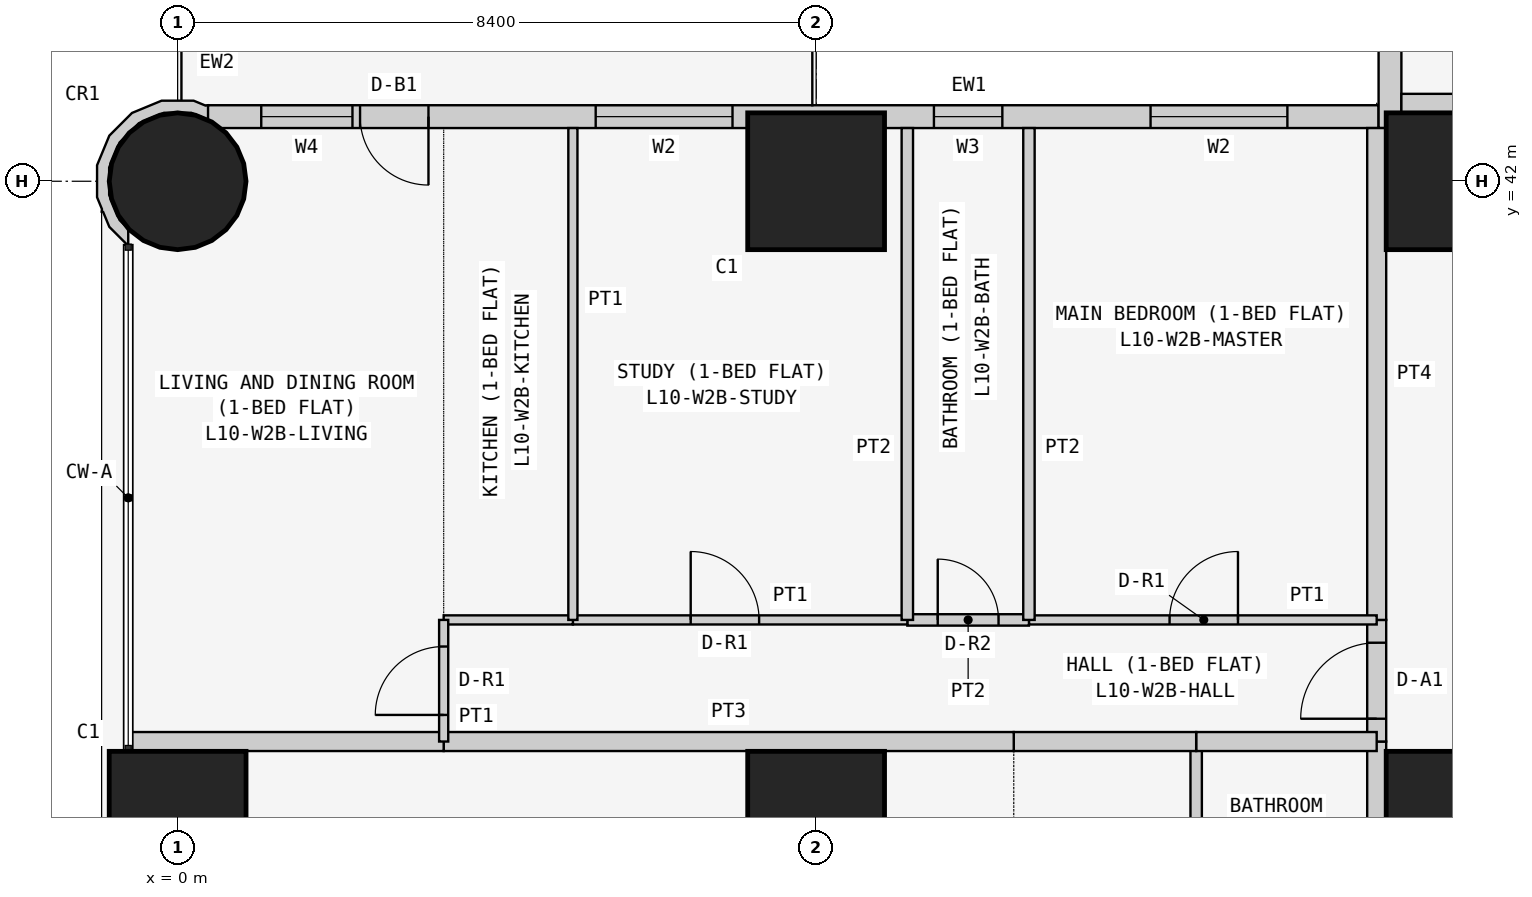
"""IFC4 building model, lengths in metres.
Left out: names, types, materials, properties, quantities, classifications, styles, units other than length and angle.
Written with IfcOpenShell. Run it as: python <this file> out.ifc"""

import sys

from ifc_helpers import new_model, si_unit, direction, frame, frame_2d, origin, origin_2d, place, context, subcontext, project, spatial, polyline, rectangle, circle, outline, extrude, element, fill, save


model = new_model("IFC4")
c1 = context("Model", 3, precision=1e-05, world=origin(), true_north=direction((0.0, 1.0)))
c2 = subcontext(c1, "Body", "Model", "MODEL_VIEW")
j1 = project(units=[si_unit("LENGTHUNIT", "METRE"), si_unit("PLANEANGLEUNIT", "RADIAN")], contexts=[c1])
p1 = place(None, origin())
s1 = spatial("IfcSite", under=j1, at=p1, CompositionType="ELEMENT")
p2 = place(p1, origin())
s2 = spatial("IfcBuilding", under=s1, at=p2, CompositionType="ELEMENT")
p3 = place(p2, frame((0.0, 0.0, 45.3)))
s3 = spatial("IfcBuildingStorey", under=s2, at=p3, CompositionType="ELEMENT", Elevation=45.3)
p4 = place(p3, frame((0.0, 33.6, 0.0), z_axis=(0.0, 0.0, 1.0), x_axis=(1.0, 0.0, 0.0)))
e1 = element("IfcColumn", 1, at=p4, inside=s3, PredefinedType="COLUMN", context=c2, shape_type="SweptSolid", body=[
    extrude(rectangle(XDim=1.8, YDim=1.8, at=origin_2d()), origin(), (0.0, 0.0, 1.0), 3.6),
])
p5 = place(p3, frame((0.0, 42.0, 0.0), z_axis=(0.0, 0.0, 1.0), x_axis=(1.0, 0.0, 0.0)))
e2 = element("IfcColumn", 2, at=p5, inside=s3, PredefinedType="COLUMN", context=c2, shape_type="SweptSolid", body=[
    extrude(circle(Radius=0.9, at=origin_2d()), origin(), (0.0, 0.0, 1.0), 3.6),
])
for number, where, z_axis, x_axis in (
    (3, (8.4, 33.6, 0.0), (0.0, 0.0, 1.0), (1.0, 0.0, 0.0)),
    (4, (8.4, 42.0, 0.0), (0.0, 0.0, 1.0), (1.0, 0.0, 0.0)),
    (5, (16.8, 33.6, 0.0), (0.0, 0.0, 1.0), (1.0, 0.0, 0.0)),
    (6, (16.8, 42.0, 0.0), (0.0, 0.0, 1.0), (1.0, 0.0, 0.0)),
):
    element("IfcColumn", number, at=place(p3, frame(where, z_axis=z_axis, x_axis=x_axis)), inside=s3, PredefinedType="COLUMN", context=c2, shape_type="SweptSolid", body=[
        extrude(rectangle(XDim=1.8, YDim=1.8, at=origin_2d()), origin(), (0.0, 0.0, 1.0), 3.6),
    ])
p6 = place(p3, frame((15.8, 42.85, 0.0), z_axis=(0.0, 0.0, 1.0), x_axis=(-1.0, 0.0, 0.0)))
e7 = element("IfcWall", 7, at=p6, inside=s3, PredefinedType="SOLIDWALL", context=c2, shape_type="SweptSolid", body=[
    extrude(rectangle(XDim=15.4, YDim=0.3, at=frame_2d((7.7, 0.0))), origin(), (0.0, 0.0, 1.0), 3.45),
])
p7 = place(p6, frame((1.2, 0.0, 0.9)))
e8 = element("IfcOpeningElement", 8, at=p7, cuts=e7, PredefinedType="OPENING", context=c2, shape_type="SweptSolid", body=[
    extrude(rectangle(XDim=1.8, YDim=1.5, at=frame_2d((0.9, 0.75))), frame((0.0, 0.16, 0.0), z_axis=(0.0, -1.0, 0.0), x_axis=(1.0, 0.0, 0.0)), (0.0, 0.0, 1.0), 0.32),
])
p8 = place(p6, frame((4.95, 0.0, 1.5)))
e9 = element("IfcOpeningElement", 9, at=p8, cuts=e7, PredefinedType="OPENING", context=c2, shape_type="SweptSolid", body=[
    extrude(rectangle(XDim=0.9, YDim=0.7, at=frame_2d((0.45, 0.35))), frame((0.0, 0.16, 0.0), z_axis=(0.0, -1.0, 0.0), x_axis=(1.0, 0.0, 0.0)), (0.0, 0.0, 1.0), 0.32),
])
p9 = place(p6, frame((8.5, 0.0, 0.9)))
e10 = element("IfcOpeningElement", 10, at=p9, cuts=e7, PredefinedType="OPENING", context=c2, shape_type="SweptSolid", body=[
    extrude(rectangle(XDim=1.8, YDim=1.5, at=frame_2d((0.9, 0.75))), frame((0.0, 0.16, 0.0), z_axis=(0.0, -1.0, 0.0), x_axis=(1.0, 0.0, 0.0)), (0.0, 0.0, 1.0), 0.32),
])
p10 = place(p6, frame((12.5, 0.0, 0.0)))
e11 = element("IfcOpeningElement", 11, at=p10, cuts=e7, PredefinedType="OPENING", context=c2, shape_type="SweptSolid", body=[
    extrude(rectangle(XDim=0.9, YDim=2.4, at=frame_2d((0.45, 1.2))), frame((0.0, 0.16, 0.0), z_axis=(0.0, -1.0, 0.0), x_axis=(1.0, 0.0, 0.0)), (0.0, 0.0, 1.0), 0.32),
])
p11 = place(p6, frame((13.5, 0.0, 0.9)))
e12 = element("IfcOpeningElement", 12, at=p11, cuts=e7, PredefinedType="OPENING", context=c2, shape_type="SweptSolid", body=[
    extrude(rectangle(XDim=1.2, YDim=1.5, at=frame_2d((0.6, 0.75))), frame((0.0, 0.16, 0.0), z_axis=(0.0, -1.0, 0.0), x_axis=(1.0, 0.0, 0.0)), (0.0, 0.0, 1.0), 0.32),
])
p12 = place(p3, frame((15.95, 58.4, 0.0), z_axis=(0.0, 0.0, 1.0), x_axis=(0.0, -1.0, 0.0)))
e13 = element("IfcWall", 13, at=p12, inside=s3, PredefinedType="SOLIDWALL", context=c2, shape_type="SweptSolid", body=[
    extrude(rectangle(XDim=15.7, YDim=0.3, at=frame_2d((7.85, 0.0))), origin(), (0.0, 0.0, 1.0), 3.45),
])
p13 = place(p12, frame((12.4, 0.0, 0.9)))
e14 = element("IfcOpeningElement", 14, at=p13, cuts=e13, PredefinedType="OPENING", context=c2, shape_type="SweptSolid", body=[
    extrude(rectangle(XDim=1.8, YDim=1.5, at=frame_2d((0.9, 0.75))), frame((0.0, 0.16, 0.0), z_axis=(0.0, -1.0, 0.0), x_axis=(1.0, 0.0, 0.0)), (0.0, 0.0, 1.0), 0.32),
])
p14 = place(p12, frame((9.55, 0.0, 1.5)))
e15 = element("IfcOpeningElement", 15, at=p14, cuts=e13, PredefinedType="OPENING", context=c2, shape_type="SweptSolid", body=[
    extrude(rectangle(XDim=0.9, YDim=0.7, at=frame_2d((0.45, 0.35))), frame((0.0, 0.16, 0.0), z_axis=(0.0, -1.0, 0.0), x_axis=(1.0, 0.0, 0.0)), (0.0, 0.0, 1.0), 0.32),
])
p15 = place(p12, frame((5.1, 0.0, 0.9)))
e16 = element("IfcOpeningElement", 16, at=p15, cuts=e13, PredefinedType="OPENING", context=c2, shape_type="SweptSolid", body=[
    extrude(rectangle(XDim=1.8, YDim=1.5, at=frame_2d((0.9, 0.75))), frame((0.0, 0.16, 0.0), z_axis=(0.0, -1.0, 0.0), x_axis=(1.0, 0.0, 0.0)), (0.0, 0.0, 1.0), 0.32),
])
p16 = place(p12, frame((2.0, 0.0, 0.0)))
e17 = element("IfcOpeningElement", 17, at=p16, cuts=e13, PredefinedType="OPENING", context=c2, shape_type="SweptSolid", body=[
    extrude(rectangle(XDim=0.9, YDim=2.4, at=frame_2d((0.45, 1.2))), frame((0.0, 0.16, 0.0), z_axis=(0.0, -1.0, 0.0), x_axis=(1.0, 0.0, 0.0)), (0.0, 0.0, 1.0), 0.32),
])
p17 = place(p12, frame((0.7, 0.0, 0.9)))
e18 = element("IfcOpeningElement", 18, at=p17, cuts=e13, PredefinedType="OPENING", context=c2, shape_type="SweptSolid", body=[
    extrude(rectangle(XDim=1.2, YDim=1.5, at=frame_2d((0.6, 0.75))), frame((0.0, 0.16, 0.0), z_axis=(0.0, -1.0, 0.0), x_axis=(1.0, 0.0, 0.0)), (0.0, 0.0, 1.0), 0.32),
])
p18 = place(p3, frame((0.364, 42.91, 0.0), z_axis=(0.0, 0.0, 1.0), x_axis=(-0.926129809145, 0.377204953059, 0.0)))
e19 = element("IfcWall", 19, at=p18, inside=s3, PredefinedType="SOLIDWALL", context=c2, shape_type="SweptSolid", body=[
    extrude(outline(polyline([(0.36, 1.803), (0.509, 1.741), (0.761, 1.486), (0.896, 1.154), (0.894, 0.795), (0.755, 0.465), (0.5, 0.213), (0.168, 0.078), (-0.1, 0.08), (0.001, -0.097), (0.03, -0.08), (0.199, -0.081), (0.589, 0.078), (0.889, 0.374), (1.053, 0.763), (1.055, 1.185), (0.896, 1.575), (0.778, 1.695), (0.769, 1.728), (0.75, 1.723), (0.6, 1.875), (0.295, 2.003), (0.281, 1.998), (0.36, 1.803)])), origin(), (0.0, 0.0, 1.0), 3.45),
])
p19 = place(p3, frame((16.1, 43.025, 0.0), z_axis=(0.0, 0.0, 1.0), x_axis=(1.0, 0.0, 0.0)))
e20 = element("IfcWall", 20, at=p19, inside=s3, PredefinedType="PARTITIONING", context=c2, shape_type="SweptSolid", body=[
    extrude(rectangle(XDim=6.871, YDim=0.25, at=frame_2d((3.436, 0.0))), origin(), (0.0, 0.0, 1.0), 3.45),
])
p20 = place(p3, frame((15.775, 32.0, 0.0), z_axis=(0.0, 0.0, 1.0), x_axis=(0.0, 1.0, 0.0)))
e21 = element("IfcWall", 21, at=p20, inside=s3, PredefinedType="PARTITIONING", context=c2, shape_type="SweptSolid", body=[
    extrude(rectangle(XDim=2.629, YDim=0.25, at=frame_2d((1.314, 0.0))), origin(), (0.0, 0.0, 1.0), 3.45),
])
p21 = place(p3, frame((15.775, 34.629, 0.0), z_axis=(0.0, 0.0, 1.0), x_axis=(0.0, 1.0, 0.0)))
e22 = element("IfcWall", 22, at=p21, inside=s3, PredefinedType="PARTITIONING", context=c2, shape_type="SweptSolid", body=[
    extrude(rectangle(XDim=1.6, YDim=0.25, at=frame_2d((0.8, 0.0))), origin(), (0.0, 0.0, 1.0), 3.45),
])
p22 = place(p21, frame((0.3, 0.0, 0.0)))
e23 = element("IfcOpeningElement", 23, at=p22, cuts=e22, PredefinedType="OPENING", context=c2, shape_type="SweptSolid", body=[
    extrude(rectangle(XDim=1.0, YDim=2.1, at=frame_2d((0.5, 1.05))), frame((0.0, 0.135, 0.0), z_axis=(0.0, -1.0, 0.0), x_axis=(1.0, 0.0, 0.0)), (0.0, 0.0, 1.0), 0.27),
])
p23 = place(p3, frame((15.775, 36.229, 0.0), z_axis=(0.0, 0.0, 1.0), x_axis=(0.0, 1.0, 0.0)))
e24 = element("IfcWall", 24, at=p23, inside=s3, PredefinedType="PARTITIONING", context=c2, shape_type="SweptSolid", body=[
    extrude(rectangle(XDim=6.471, YDim=0.25, at=frame_2d((3.235, 0.0))), origin(), (0.0, 0.0, 1.0), 3.45),
])
p24 = place(p3, frame((13.4, 32.0, 0.0), z_axis=(0.0, 0.0, 1.0), x_axis=(0.0, 1.0, 0.0)))
e25 = element("IfcWall", 25, at=p24, inside=s3, PredefinedType="PARTITIONING", context=c2, shape_type="SweptSolid", body=[
    extrude(rectangle(XDim=2.629, YDim=0.15, at=frame_2d((1.314, 0.0))), origin(), (0.0, 0.0, 1.0), 3.45),
])
p25 = place(p3, frame((13.4, 34.629, 0.0), z_axis=(0.0, 0.0, 1.0), x_axis=(1.0, 0.0, 0.0)))
e26 = element("IfcWall", 26, at=p25, inside=s3, PredefinedType="PARTITIONING", context=c2, shape_type="SweptSolid", body=[
    extrude(rectangle(XDim=2.375, YDim=0.25, at=frame_2d((1.188, 0.0))), origin(), (0.0, 0.0, 1.0), 3.45),
])
p26 = place(p3, frame((11.0, 34.629, 0.0), z_axis=(0.0, 0.0, 1.0), x_axis=(1.0, 0.0, 0.0)))
e27 = element("IfcWall", 27, at=p26, inside=s3, PredefinedType="PARTITIONING", context=c2, shape_type="SweptSolid", body=[
    extrude(rectangle(XDim=2.4, YDim=0.25, at=frame_2d((1.2, 0.0))), origin(), (0.0, 0.0, 1.0), 3.45),
])
p27 = place(p3, frame((3.5, 34.629, 0.0), z_axis=(0.0, 0.0, 1.0), x_axis=(1.0, 0.0, 0.0)))
e28 = element("IfcWall", 28, at=p27, inside=s3, PredefinedType="PARTITIONING", context=c2, shape_type="SweptSolid", body=[
    extrude(rectangle(XDim=7.5, YDim=0.25, at=frame_2d((3.75, 0.0))), origin(), (0.0, 0.0, 1.0), 3.45),
])
p28 = place(p3, frame((-0.65, 34.629, 0.0), z_axis=(0.0, 0.0, 1.0), x_axis=(1.0, 0.0, 0.0)))
e29 = element("IfcWall", 29, at=p28, inside=s3, PredefinedType="PARTITIONING", context=c2, shape_type="SweptSolid", body=[
    extrude(rectangle(XDim=4.15, YDim=0.25, at=frame_2d((2.075, 0.0))), origin(), (0.0, 0.0, 1.0), 3.45),
])
p29 = place(p3, frame((11.2, 36.229, 0.0), z_axis=(0.0, 0.0, 1.0), x_axis=(1.0, 0.0, 0.0)))
e30 = element("IfcWall", 30, at=p29, inside=s3, PredefinedType="PARTITIONING", context=c2, shape_type="SweptSolid", body=[
    extrude(rectangle(XDim=4.575, YDim=0.12, at=frame_2d((2.288, 0.0))), origin(), (0.0, 0.0, 1.0), 3.45),
])
p30 = place(p29, frame((1.85, 0.0, 0.0)))
e31 = element("IfcOpeningElement", 31, at=p30, cuts=e30, PredefinedType="OPENING", context=c2, shape_type="SweptSolid", body=[
    extrude(rectangle(XDim=0.9, YDim=2.1, at=frame_2d((0.45, 1.05))), frame((0.0, 0.07, 0.0), z_axis=(0.0, -1.0, 0.0), x_axis=(1.0, 0.0, 0.0)), (0.0, 0.0, 1.0), 0.14),
])
p31 = place(p3, frame((9.6, 36.229, 0.0), z_axis=(0.0, 0.0, 1.0), x_axis=(1.0, 0.0, 0.0)))
e32 = element("IfcWall", 32, at=p31, inside=s3, PredefinedType="PARTITIONING", context=c2, shape_type="SweptSolid", body=[
    extrude(rectangle(XDim=1.6, YDim=0.15, at=frame_2d((0.8, 0.0))), origin(), (0.0, 0.0, 1.0), 3.45),
])
p32 = place(p31, frame((0.4, 0.0, 0.0)))
e33 = element("IfcOpeningElement", 33, at=p32, cuts=e32, PredefinedType="OPENING", context=c2, shape_type="SweptSolid", body=[
    extrude(rectangle(XDim=0.8, YDim=2.1, at=frame_2d((0.4, 1.05))), frame((0.0, 0.085, 0.0), z_axis=(0.0, -1.0, 0.0), x_axis=(1.0, 0.0, 0.0)), (0.0, 0.0, 1.0), 0.17),
])
p33 = place(p3, frame((5.2, 36.229, 0.0), z_axis=(0.0, 0.0, 1.0), x_axis=(1.0, 0.0, 0.0)))
e34 = element("IfcWall", 34, at=p33, inside=s3, PredefinedType="PARTITIONING", context=c2, shape_type="SweptSolid", body=[
    extrude(rectangle(XDim=4.4, YDim=0.12, at=frame_2d((2.2, 0.0))), origin(), (0.0, 0.0, 1.0), 3.45),
])
p34 = place(p33, frame((1.55, 0.0, 0.0)))
e35 = element("IfcOpeningElement", 35, at=p34, cuts=e34, PredefinedType="OPENING", context=c2, shape_type="SweptSolid", body=[
    extrude(rectangle(XDim=0.9, YDim=2.1, at=frame_2d((0.45, 1.05))), frame((0.0, 0.07, 0.0), z_axis=(0.0, -1.0, 0.0), x_axis=(1.0, 0.0, 0.0)), (0.0, 0.0, 1.0), 0.14),
])
p35 = place(p3, frame((3.5, 36.229, 0.0), z_axis=(0.0, 0.0, 1.0), x_axis=(1.0, 0.0, 0.0)))
e36 = element("IfcWall", 36, at=p35, inside=s3, PredefinedType="PARTITIONING", context=c2, shape_type="SweptSolid", body=[
    extrude(rectangle(XDim=1.7, YDim=0.12, at=frame_2d((0.85, 0.0))), origin(), (0.0, 0.0, 1.0), 3.45),
])
p36 = place(p3, frame((3.5, 34.629, 0.0), z_axis=(0.0, 0.0, 1.0), x_axis=(0.0, 1.0, 0.0)))
e37 = element("IfcWall", 37, at=p36, inside=s3, PredefinedType="PARTITIONING", context=c2, shape_type="SweptSolid", body=[
    extrude(rectangle(XDim=1.6, YDim=0.12, at=frame_2d((0.8, 0.0))), origin(), (0.0, 0.0, 1.0), 3.45),
])
p37 = place(p36, frame((0.35, 0.0, 0.0)))
e38 = element("IfcOpeningElement", 38, at=p37, cuts=e37, PredefinedType="OPENING", context=c2, shape_type="SweptSolid", body=[
    extrude(rectangle(XDim=0.9, YDim=2.1, at=frame_2d((0.45, 1.05))), frame((0.0, 0.07, 0.0), z_axis=(0.0, -1.0, 0.0), x_axis=(1.0, 0.0, 0.0)), (0.0, 0.0, 1.0), 0.14),
])
for number, where, z_axis, x_axis in (
    (39, (11.2, 36.229, 0.0), (0.0, 0.0, 1.0), (0.0, 1.0, 0.0)),
    (40, (9.6, 36.229, 0.0), (0.0, 0.0, 1.0), (0.0, 1.0, 0.0)),
):
    element("IfcWall", number, at=place(p3, frame(where, z_axis=z_axis, x_axis=x_axis)), inside=s3, PredefinedType="PARTITIONING", context=c2, shape_type="SweptSolid", body=[
        extrude(rectangle(XDim=6.471, YDim=0.15, at=frame_2d((3.235, 0.0))), origin(), (0.0, 0.0, 1.0), 3.45),
    ])
p38 = place(p3, frame((5.2, 36.229, 0.0), z_axis=(0.0, 0.0, 1.0), x_axis=(0.0, 1.0, 0.0)))
e41 = element("IfcWall", 41, at=p38, inside=s3, PredefinedType="PARTITIONING", context=c2, shape_type="SweptSolid", body=[
    extrude(rectangle(XDim=6.471, YDim=0.12, at=frame_2d((3.235, 0.0))), origin(), (0.0, 0.0, 1.0), 3.45),
])
p39 = place(p7, origin())
e42 = element("IfcWindow", 42, at=p39, inside=s3, PartitioningType="SINGLE_PANEL", PredefinedType="WINDOW", context=c2, shape_type="SweptSolid", body=[
    extrude(rectangle(XDim=1.8, YDim=1.5, at=frame_2d((0.9, 0.75))), frame((0.0, 0.03, 0.0), z_axis=(0.0, -1.0, 0.0), x_axis=(1.0, 0.0, 0.0)), (0.0, 0.0, 1.0), 0.06),
])
fill(e8, e42)
p40 = place(p8, origin())
e43 = element("IfcWindow", 43, at=p40, inside=s3, PartitioningType="SINGLE_PANEL", PredefinedType="WINDOW", context=c2, shape_type="SweptSolid", body=[
    extrude(rectangle(XDim=0.9, YDim=0.7, at=frame_2d((0.45, 0.35))), frame((0.0, 0.03, 0.0), z_axis=(0.0, -1.0, 0.0), x_axis=(1.0, 0.0, 0.0)), (0.0, 0.0, 1.0), 0.06),
])
fill(e9, e43)
p41 = place(p9, origin())
e44 = element("IfcWindow", 44, at=p41, inside=s3, PartitioningType="SINGLE_PANEL", PredefinedType="WINDOW", context=c2, shape_type="SweptSolid", body=[
    extrude(rectangle(XDim=1.8, YDim=1.5, at=frame_2d((0.9, 0.75))), frame((0.0, 0.03, 0.0), z_axis=(0.0, -1.0, 0.0), x_axis=(1.0, 0.0, 0.0)), (0.0, 0.0, 1.0), 0.06),
])
fill(e10, e44)
p42 = place(p10, origin())
e45 = element("IfcDoor", 45, at=p42, inside=s3, OperationType="SINGLE_SWING_LEFT", PredefinedType="DOOR", context=c2, shape_type="SweptSolid", body=[
    extrude(rectangle(XDim=0.9, YDim=2.4, at=frame_2d((0.45, 1.2))), frame((0.0, 0.025, 0.0), z_axis=(0.0, -1.0, 0.0), x_axis=(1.0, 0.0, 0.0)), (0.0, 0.0, 1.0), 0.05),
])
fill(e11, e45)
p43 = place(p11, origin())
e46 = element("IfcWindow", 46, at=p43, inside=s3, PartitioningType="SINGLE_PANEL", PredefinedType="WINDOW", context=c2, shape_type="SweptSolid", body=[
    extrude(rectangle(XDim=1.2, YDim=1.5, at=frame_2d((0.6, 0.75))), frame((0.0, 0.03, 0.0), z_axis=(0.0, -1.0, 0.0), x_axis=(1.0, 0.0, 0.0)), (0.0, 0.0, 1.0), 0.06),
])
fill(e12, e46)
p44 = place(p22, origin())
e47 = element("IfcDoor", 47, at=p44, inside=s3, OperationType="SINGLE_SWING_LEFT", PredefinedType="DOOR", context=c2, shape_type="SweptSolid", body=[
    extrude(rectangle(XDim=1.0, YDim=2.1, at=frame_2d((0.5, 1.05))), frame((0.0, 0.025, 0.0), z_axis=(0.0, -1.0, 0.0), x_axis=(1.0, 0.0, 0.0)), (0.0, 0.0, 1.0), 0.05),
])
fill(e23, e47)
p45 = place(p30, origin())
e48 = element("IfcDoor", 48, at=p45, inside=s3, OperationType="SINGLE_SWING_RIGHT", PredefinedType="DOOR", context=c2, shape_type="SweptSolid", body=[
    extrude(rectangle(XDim=0.9, YDim=2.1, at=frame_2d((0.45, 1.05))), frame((0.0, 0.025, 0.0), z_axis=(0.0, -1.0, 0.0), x_axis=(1.0, 0.0, 0.0)), (0.0, 0.0, 1.0), 0.05),
])
fill(e31, e48)
p46 = place(p32, origin())
e49 = element("IfcDoor", 49, at=p46, inside=s3, OperationType="SINGLE_SWING_LEFT", PredefinedType="DOOR", context=c2, shape_type="SweptSolid", body=[
    extrude(rectangle(XDim=0.8, YDim=2.1, at=frame_2d((0.4, 1.05))), frame((0.0, 0.025, 0.0), z_axis=(0.0, -1.0, 0.0), x_axis=(1.0, 0.0, 0.0)), (0.0, 0.0, 1.0), 0.05),
])
fill(e33, e49)
p47 = place(p34, origin())
e50 = element("IfcDoor", 50, at=p47, inside=s3, OperationType="SINGLE_SWING_LEFT", PredefinedType="DOOR", context=c2, shape_type="SweptSolid", body=[
    extrude(rectangle(XDim=0.9, YDim=2.1, at=frame_2d((0.45, 1.05))), frame((0.0, 0.025, 0.0), z_axis=(0.0, -1.0, 0.0), x_axis=(1.0, 0.0, 0.0)), (0.0, 0.0, 1.0), 0.05),
])
fill(e35, e50)
p48 = place(p37, origin())
e51 = element("IfcDoor", 51, at=p48, inside=s3, OperationType="SINGLE_SWING_LEFT", PredefinedType="DOOR", context=c2, shape_type="SweptSolid", body=[
    extrude(rectangle(XDim=0.9, YDim=2.1, at=frame_2d((0.45, 1.05))), frame((0.0, 0.025, 0.0), z_axis=(0.0, -1.0, 0.0), x_axis=(1.0, 0.0, 0.0)), (0.0, 0.0, 1.0), 0.05),
])
fill(e38, e51)
save(model, sys.argv[1])
